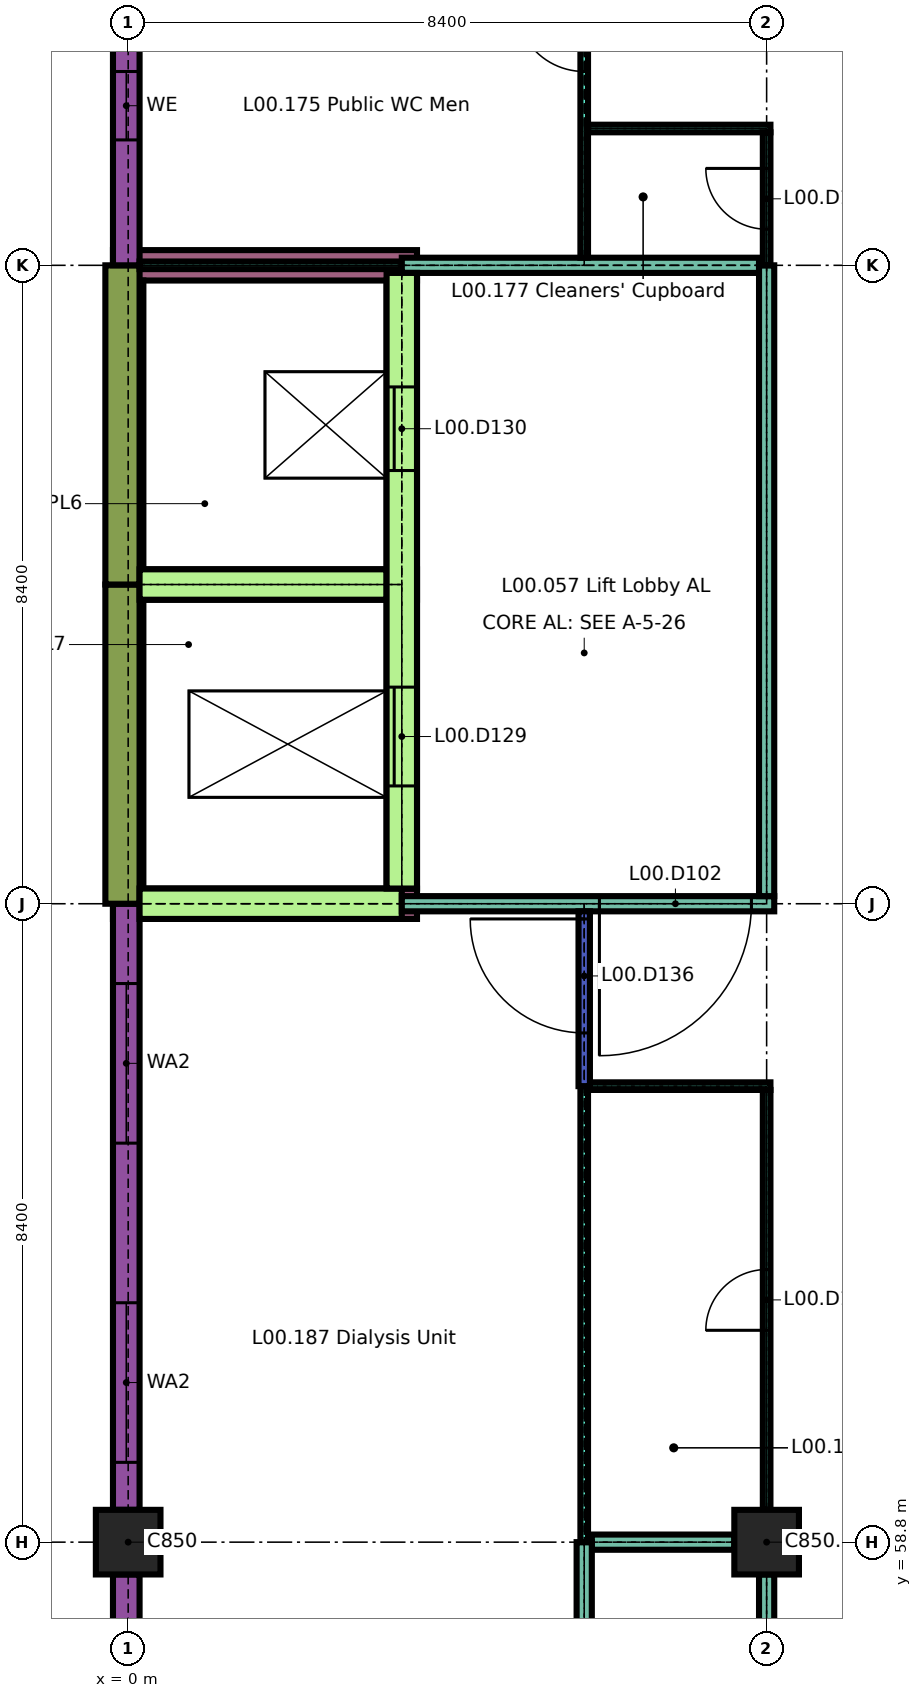
"""IFC4 building model, lengths in metres.
Left out: names, types, materials, properties, quantities, classifications, styles, units other than length and angle.
Written with IfcOpenShell. Run it as: python <this file> out.ifc"""

import sys

from ifc_helpers import new_model, si_unit, direction, frame, frame_2d, origin, origin_2d, place, context, subcontext, project, spatial, rectangle, extrude, element, fill, save


model = new_model("IFC4")
c1 = context("Model", 3, precision=1e-05, world=origin(), true_north=direction((0.0, 1.0)))
c2 = subcontext(c1, "Body", "Model", "MODEL_VIEW")
j1 = project(units=[si_unit("LENGTHUNIT", "METRE"), si_unit("PLANEANGLEUNIT", "RADIAN")], contexts=[c1])
p1 = place(None, origin())
s1 = spatial("IfcSite", under=j1, at=p1, CompositionType="ELEMENT")
p2 = place(p1, origin())
s2 = spatial("IfcBuilding", under=s1, at=p2, CompositionType="ELEMENT")
p3 = place(p2, origin())
s3 = spatial("IfcBuildingStorey", under=s2, at=p3, CompositionType="ELEMENT", Elevation=0.0)
for number, where, z_axis, x_axis in (
    (1, (-0.2, 67.2, -1.4), (0.0, 0.0, 1.0), (1.0, 0.0, 0.0)),
    (2, (-0.2, 71.4, -1.4), (0.0, 0.0, 1.0), (1.0, 0.0, 0.0)),
    (3, (-0.2, 75.6, -1.4), (0.0, 0.0, 1.0), (1.0, 0.0, 0.0)),
):
    element("IfcWall", number, at=place(p3, frame(where, z_axis=z_axis, x_axis=x_axis)), inside=s3, PredefinedType="SOLIDWALL", context=c2, shape_type="SweptSolid", body=[
        extrude(rectangle(XDim=4.0, YDim=0.4, at=frame_2d((2.0, 0.0))), origin(), (0.0, 0.0, 1.0), 0.95),
    ])
for number, where, z_axis, x_axis in (
    (4, (0.0, 67.4, -1.4), (0.0, 0.0, 1.0), (0.0, 1.0, 0.0)),
    (5, (3.6, 67.4, -1.4), (0.0, 0.0, 1.0), (0.0, 1.0, 0.0)),
):
    element("IfcWall", number, at=place(p3, frame(where, z_axis=z_axis, x_axis=x_axis)), inside=s3, PredefinedType="SOLIDWALL", context=c2, shape_type="SweptSolid", body=[
        extrude(rectangle(XDim=8.0, YDim=0.4, at=frame_2d((4.0, 0.0))), origin(), (0.0, 0.0, 1.0), 0.95),
    ])
for number, where, z_axis, x_axis in (
    (6, (0.0, 58.8, 0.0), (0.0, 0.0, 1.0), (1.0, 0.0, 0.0)),
    (7, (8.4, 58.8, 0.0), (0.0, 0.0, 1.0), (1.0, 0.0, 0.0)),
):
    element("IfcColumn", number, at=place(p3, frame(where, z_axis=z_axis, x_axis=x_axis)), inside=s3, PredefinedType="COLUMN", context=c2, shape_type="SweptSolid", body=[
        extrude(rectangle(XDim=0.85, YDim=0.85, at=origin_2d()), origin(), (0.0, 0.0, 1.0), 4.14),
    ])
p4 = place(p3, frame((-0.025, 50.825, 0.0), z_axis=(0.0, 0.0, 1.0), x_axis=(0.0, 1.0, 0.0)))
e8 = element("IfcWall", 8, at=p4, inside=s3, PredefinedType="SOLIDWALL", context=c2, shape_type="SweptSolid", body=[
    extrude(rectangle(XDim=7.55, YDim=0.35, at=frame_2d((3.775, 0.0))), origin(), (0.0, 0.0, 1.0), 3.84),
])
p5 = place(p4, frame((0.625, 0.0, 0.9)))
e9 = element("IfcOpeningElement", 9, at=p5, cuts=e8, PredefinedType="OPENING", context=c2, shape_type="SweptSolid", body=[
    extrude(rectangle(XDim=2.1, YDim=2.1, at=frame_2d((1.05, 1.05))), frame((0.0, 0.185, 0.0), z_axis=(0.0, -1.0, 0.0), x_axis=(1.0, 0.0, 0.0)), (0.0, 0.0, 1.0), 0.37),
])
p6 = place(p4, frame((4.825, 0.0, 0.9)))
e10 = element("IfcOpeningElement", 10, at=p6, cuts=e8, PredefinedType="OPENING", context=c2, shape_type="SweptSolid", body=[
    extrude(rectangle(XDim=2.1, YDim=2.1, at=frame_2d((1.05, 1.05))), frame((0.0, 0.185, 0.0), z_axis=(0.0, -1.0, 0.0), x_axis=(1.0, 0.0, 0.0)), (0.0, 0.0, 1.0), 0.37),
])
p7 = place(p3, frame((-0.025, 59.225, 0.0), z_axis=(0.0, 0.0, 1.0), x_axis=(0.0, 1.0, 0.0)))
e11 = element("IfcWall", 11, at=p7, inside=s3, PredefinedType="SOLIDWALL", context=c2, shape_type="SweptSolid", body=[
    extrude(rectangle(XDim=7.975, YDim=0.35, at=frame_2d((3.987, 0.0))), origin(), (0.0, 0.0, 1.0), 3.84),
])
p8 = place(p7, frame((0.625, 0.0, 0.9)))
e12 = element("IfcOpeningElement", 12, at=p8, cuts=e11, PredefinedType="OPENING", context=c2, shape_type="SweptSolid", body=[
    extrude(rectangle(XDim=2.1, YDim=2.1, at=frame_2d((1.05, 1.05))), frame((0.0, 0.185, 0.0), z_axis=(0.0, -1.0, 0.0), x_axis=(1.0, 0.0, 0.0)), (0.0, 0.0, 1.0), 0.37),
])
p9 = place(p7, frame((4.825, 0.0, 0.9)))
e13 = element("IfcOpeningElement", 13, at=p9, cuts=e11, PredefinedType="OPENING", context=c2, shape_type="SweptSolid", body=[
    extrude(rectangle(XDim=2.1, YDim=2.1, at=frame_2d((1.05, 1.05))), frame((0.0, 0.185, 0.0), z_axis=(0.0, -1.0, 0.0), x_axis=(1.0, 0.0, 0.0)), (0.0, 0.0, 1.0), 0.37),
])
p10 = place(p3, frame((-0.075, 67.2, 0.0), z_axis=(0.0, 0.0, 1.0), x_axis=(0.0, 1.0, 0.0)))
e14 = element("IfcWall", 14, at=p10, inside=s3, PredefinedType="SOLIDWALL", context=c2, shape_type="SweptSolid", body=[
    extrude(rectangle(XDim=4.2, YDim=0.45, at=frame_2d((2.1, 0.0))), origin(), (0.0, 0.0, 1.0), 4.14),
])
p11 = place(p3, frame((-0.075, 71.4, 0.0), z_axis=(0.0, 0.0, 1.0), x_axis=(0.0, 1.0, 0.0)))
e15 = element("IfcWall", 15, at=p11, inside=s3, PredefinedType="SOLIDWALL", context=c2, shape_type="SweptSolid", body=[
    extrude(rectangle(XDim=4.2, YDim=0.45, at=frame_2d((2.1, 0.0))), origin(), (0.0, 0.0, 1.0), 4.14),
])
p12 = place(p3, frame((-0.025, 75.6, 0.0), z_axis=(0.0, 0.0, 1.0), x_axis=(0.0, 1.0, 0.0)))
e16 = element("IfcWall", 16, at=p12, inside=s3, PredefinedType="SOLIDWALL", context=c2, shape_type="SweptSolid", body=[
    extrude(rectangle(XDim=4.2, YDim=0.35, at=frame_2d((2.1, 0.0))), origin(), (0.0, 0.0, 1.0), 3.84),
])
p13 = place(p12, frame((1.65, 0.0, 1.5)))
e17 = element("IfcOpeningElement", 17, at=p13, cuts=e16, PredefinedType="OPENING", context=c2, shape_type="SweptSolid", body=[
    extrude(rectangle(XDim=0.9, YDim=0.6, at=frame_2d((0.45, 0.3))), frame((0.0, 0.185, 0.0), z_axis=(0.0, -1.0, 0.0), x_axis=(1.0, 0.0, 0.0)), (0.0, 0.0, 1.0), 0.37),
])
p14 = place(p3, frame((6.1, 58.8, 0.0), z_axis=(0.0, 0.0, 1.0), x_axis=(1.0, 0.0, 0.0)))
e18 = element("IfcWall", 18, at=p14, inside=s3, PredefinedType="PARTITIONING", context=c2, shape_type="SweptSolid", body=[
    extrude(rectangle(XDim=1.875, YDim=0.2, at=frame_2d((0.938, 0.0))), origin(), (0.0, 0.0, 1.0), 4.14),
])
p15 = place(p3, frame((6.075, 64.8, 0.0), z_axis=(0.0, 0.0, 1.0), x_axis=(1.0, 0.0, 0.0)))
e19 = element("IfcWall", 19, at=p15, inside=s3, PredefinedType="PARTITIONING", context=c2, shape_type="SweptSolid", body=[
    extrude(rectangle(XDim=2.375, YDim=0.1, at=frame_2d((1.188, 0.0))), origin(), (0.0, 0.0, 1.0), 4.14),
])
p16 = place(p3, frame((0.15, 67.2, 0.0), z_axis=(0.0, 0.0, 1.0), x_axis=(1.0, 0.0, 0.0)))
e20 = element("IfcWall", 20, at=p16, inside=s3, PredefinedType="SHEAR", context=c2, shape_type="SweptSolid", body=[
    extrude(rectangle(XDim=3.45, YDim=0.4, at=frame_2d((1.725, 0.0))), origin(), (0.0, 0.0, 1.0), 4.14),
])
p17 = place(p3, frame((3.6, 67.2, 0.0), z_axis=(0.0, 0.0, 1.0), x_axis=(1.0, 0.0, 0.0)))
e21 = element("IfcWall", 21, at=p17, inside=s3, PredefinedType="PARTITIONING", context=c2, shape_type="SweptSolid", body=[
    extrude(rectangle(XDim=4.9, YDim=0.2, at=frame_2d((2.45, 0.0))), origin(), (0.0, 0.0, 1.0), 4.14),
])
p18 = place(p17, frame((2.6, 0.0, 0.0)))
e22 = element("IfcOpeningElement", 22, at=p18, cuts=e21, PredefinedType="OPENING", context=c2, shape_type="SweptSolid", body=[
    extrude(rectangle(XDim=2.0, YDim=2.4, at=frame_2d((1.0, 1.2))), frame((0.0, 0.11, 0.0), z_axis=(0.0, -1.0, 0.0), x_axis=(1.0, 0.0, 0.0)), (0.0, 0.0, 1.0), 0.22),
])
p19 = place(p3, frame((0.15, 71.4, 0.0), z_axis=(0.0, 0.0, 1.0), x_axis=(1.0, 0.0, 0.0)))
e23 = element("IfcWall", 23, at=p19, inside=s3, PredefinedType="SHEAR", context=c2, shape_type="SweptSolid", body=[
    extrude(rectangle(XDim=3.25, YDim=0.4, at=frame_2d((1.625, 0.0))), origin(), (0.0, 0.0, 1.0), 4.14),
])
p20 = place(p3, frame((0.15, 75.6, 0.0), z_axis=(0.0, 0.0, 1.0), x_axis=(1.0, 0.0, 0.0)))
e24 = element("IfcWall", 24, at=p20, inside=s3, PredefinedType="PARTITIONING", context=c2, shape_type="SweptSolid", body=[
    extrude(rectangle(XDim=3.45, YDim=0.1, at=frame_2d((1.725, 0.0))), origin(), (0.0, 0.0, 1.0), 4.14),
])
p21 = place(p3, frame((3.6, 75.6, 0.0), z_axis=(0.0, 0.0, 1.0), x_axis=(1.0, 0.0, 0.0)))
e25 = element("IfcWall", 25, at=p21, inside=s3, PredefinedType="PARTITIONING", context=c2, shape_type="SweptSolid", body=[
    extrude(rectangle(XDim=4.7, YDim=0.2, at=frame_2d((2.35, 0.0))), origin(), (0.0, 0.0, 1.0), 4.14),
])
p22 = place(p3, frame((6.05, 77.4, 0.0), z_axis=(0.0, 0.0, 1.0), x_axis=(1.0, 0.0, 0.0)))
e26 = element("IfcWall", 26, at=p22, inside=s3, PredefinedType="PARTITIONING", context=c2, shape_type="SweptSolid", body=[
    extrude(rectangle(XDim=2.4, YDim=0.1, at=frame_2d((1.2, 0.0))), origin(), (0.0, 0.0, 1.0), 4.14),
])
p23 = place(p3, frame((3.6, 67.4, 0.0), z_axis=(0.0, 0.0, 1.0), x_axis=(0.0, 1.0, 0.0)))
e27 = element("IfcWall", 27, at=p23, inside=s3, PredefinedType="SHEAR", context=c2, shape_type="SweptSolid", body=[
    extrude(rectangle(XDim=8.1, YDim=0.4, at=frame_2d((4.05, 0.0))), origin(), (0.0, 0.0, 1.0), 4.14),
])
p24 = place(p23, frame((1.35, 0.0, 0.0)))
e28 = element("IfcOpeningElement", 28, at=p24, cuts=e27, PredefinedType="OPENING", context=c2, shape_type="SweptSolid", body=[
    extrude(rectangle(XDim=1.3, YDim=2.1, at=frame_2d((0.65, 1.05))), frame((0.0, 0.21, 0.0), z_axis=(0.0, -1.0, 0.0), x_axis=(1.0, 0.0, 0.0)), (0.0, 0.0, 1.0), 0.42),
])
p25 = place(p23, frame((5.5, 0.0, 0.0)))
e29 = element("IfcOpeningElement", 29, at=p25, cuts=e27, PredefinedType="OPENING", context=c2, shape_type="SweptSolid", body=[
    extrude(rectangle(XDim=1.1, YDim=2.1, at=frame_2d((0.55, 1.05))), frame((0.0, 0.21, 0.0), z_axis=(0.0, -1.0, 0.0), x_axis=(1.0, 0.0, 0.0)), (0.0, 0.0, 1.0), 0.42),
])
p26 = place(p3, frame((6.0, 52.8, 0.0), z_axis=(0.0, 0.0, 1.0), x_axis=(0.0, 1.0, 0.0)))
e30 = element("IfcWall", 30, at=p26, inside=s3, PredefinedType="PARTITIONING", context=c2, shape_type="SweptSolid", body=[
    extrude(rectangle(XDim=6.0, YDim=0.2, at=frame_2d((3.0, 0.0))), origin(), (0.0, 0.0, 1.0), 4.14),
])
p27 = place(p3, frame((6.0, 58.8, 0.0), z_axis=(0.0, 0.0, 1.0), x_axis=(0.0, 1.0, 0.0)))
e31 = element("IfcWall", 31, at=p27, inside=s3, PredefinedType="PARTITIONING", context=c2, shape_type="SweptSolid", body=[
    extrude(rectangle(XDim=6.0, YDim=0.1, at=frame_2d((3.0, 0.0))), origin(), (0.0, 0.0, 1.0), 4.14),
])
p28 = place(p3, frame((6.0, 64.8, 0.0), z_axis=(0.0, 0.0, 1.0), x_axis=(0.0, 1.0, 0.0)))
e32 = element("IfcWall", 32, at=p28, inside=s3, PredefinedType="PARTITIONING", context=c2, shape_type="SweptSolid", body=[
    extrude(rectangle(XDim=2.3, YDim=0.15, at=frame_2d((1.15, 0.0))), origin(), (0.0, 0.0, 1.0), 4.14),
])
p29 = place(p28, frame((0.7, 0.0, 0.0)))
e33 = element("IfcOpeningElement", 33, at=p29, cuts=e32, PredefinedType="OPENING", context=c2, shape_type="SweptSolid", body=[
    extrude(rectangle(XDim=1.5, YDim=2.4, at=frame_2d((0.75, 1.2))), frame((0.0, 0.085, 0.0), z_axis=(0.0, -1.0, 0.0), x_axis=(1.0, 0.0, 0.0)), (0.0, 0.0, 1.0), 0.17),
])
p30 = place(p3, frame((6.0, 75.7, 0.0), z_axis=(0.0, 0.0, 1.0), x_axis=(0.0, 1.0, 0.0)))
e34 = element("IfcWall", 34, at=p30, inside=s3, PredefinedType="PARTITIONING", context=c2, shape_type="SweptSolid", body=[
    extrude(rectangle(XDim=8.25, YDim=0.1, at=frame_2d((4.125, 0.0))), origin(), (0.0, 0.0, 1.0), 4.14),
])
p31 = place(p30, frame((2.45, 0.0, 0.0)))
e35 = element("IfcOpeningElement", 35, at=p31, cuts=e34, PredefinedType="OPENING", context=c2, shape_type="SweptSolid", body=[
    extrude(rectangle(XDim=0.9, YDim=2.1, at=frame_2d((0.45, 1.05))), frame((0.0, 0.06, 0.0), z_axis=(0.0, -1.0, 0.0), x_axis=(1.0, 0.0, 0.0)), (0.0, 0.0, 1.0), 0.12),
])
p32 = place(p30, frame((4.85, 0.0, 0.0)))
e36 = element("IfcOpeningElement", 36, at=p32, cuts=e34, PredefinedType="OPENING", context=c2, shape_type="SweptSolid", body=[
    extrude(rectangle(XDim=0.9, YDim=2.1, at=frame_2d((0.45, 1.05))), frame((0.0, 0.06, 0.0), z_axis=(0.0, -1.0, 0.0), x_axis=(1.0, 0.0, 0.0)), (0.0, 0.0, 1.0), 0.12),
])
p33 = place(p3, frame((8.4, 52.9, 0.0), z_axis=(0.0, 0.0, 1.0), x_axis=(0.0, 1.0, 0.0)))
e37 = element("IfcWall", 37, at=p33, inside=s3, PredefinedType="PARTITIONING", context=c2, shape_type="SweptSolid", body=[
    extrude(rectangle(XDim=5.475, YDim=0.2, at=frame_2d((2.738, 0.0))), origin(), (0.0, 0.0, 1.0), 4.14),
])
p34 = place(p33, frame((2.288, 0.0, 0.0)))
e38 = element("IfcOpeningElement", 38, at=p34, cuts=e37, PredefinedType="OPENING", context=c2, shape_type="SweptSolid", body=[
    extrude(rectangle(XDim=0.9, YDim=2.1, at=frame_2d((0.45, 1.05))), frame((0.0, 0.11, 0.0), z_axis=(0.0, -1.0, 0.0), x_axis=(1.0, 0.0, 0.0)), (0.0, 0.0, 1.0), 0.22),
])
p35 = place(p3, frame((8.4, 59.225, 0.0), z_axis=(0.0, 0.0, 1.0), x_axis=(0.0, 1.0, 0.0)))
e39 = element("IfcWall", 39, at=p35, inside=s3, PredefinedType="PARTITIONING", context=c2, shape_type="SweptSolid", body=[
    extrude(rectangle(XDim=5.525, YDim=0.1, at=frame_2d((2.762, 0.0))), origin(), (0.0, 0.0, 1.0), 4.14),
])
p36 = place(p35, frame((2.363, 0.0, 0.0)))
e40 = element("IfcOpeningElement", 40, at=p36, cuts=e39, PredefinedType="OPENING", context=c2, shape_type="SweptSolid", body=[
    extrude(rectangle(XDim=0.8, YDim=2.1, at=frame_2d((0.4, 1.05))), frame((0.0, 0.06, 0.0), z_axis=(0.0, -1.0, 0.0), x_axis=(1.0, 0.0, 0.0)), (0.0, 0.0, 1.0), 0.12),
])
p37 = place(p3, frame((8.4, 67.3, 0.0), z_axis=(0.0, 0.0, 1.0), x_axis=(0.0, 1.0, 0.0)))
e41 = element("IfcWall", 41, at=p37, inside=s3, PredefinedType="PARTITIONING", context=c2, shape_type="SweptSolid", body=[
    extrude(rectangle(XDim=8.3, YDim=0.2, at=frame_2d((4.15, 0.0))), origin(), (0.0, 0.0, 1.0), 4.14),
])
p38 = place(p3, frame((8.4, 75.6, 0.0), z_axis=(0.0, 0.0, 1.0), x_axis=(0.0, 1.0, 0.0)))
e42 = element("IfcWall", 42, at=p38, inside=s3, PredefinedType="PARTITIONING", context=c2, shape_type="SweptSolid", body=[
    extrude(rectangle(XDim=1.75, YDim=0.1, at=frame_2d((0.875, 0.0))), origin(), (0.0, 0.0, 1.0), 4.14),
])
p39 = place(p38, frame((0.475, 0.0, 0.0)))
e43 = element("IfcOpeningElement", 43, at=p39, cuts=e42, PredefinedType="OPENING", context=c2, shape_type="SweptSolid", body=[
    extrude(rectangle(XDim=0.8, YDim=2.1, at=frame_2d((0.4, 1.05))), frame((0.0, 0.06, 0.0), z_axis=(0.0, -1.0, 0.0), x_axis=(1.0, 0.0, 0.0)), (0.0, 0.0, 1.0), 0.12),
])
p40 = place(p8, origin())
e44 = element("IfcWindow", 44, at=p40, inside=s3, PartitioningType="DOUBLE_PANEL_VERTICAL", PredefinedType="WINDOW", context=c2, shape_type="SweptSolid", body=[
    extrude(rectangle(XDim=2.1, YDim=2.1, at=frame_2d((1.05, 1.05))), frame((0.0, 0.03, 0.0), z_axis=(0.0, -1.0, 0.0), x_axis=(1.0, 0.0, 0.0)), (0.0, 0.0, 1.0), 0.06),
])
fill(e12, e44)
p41 = place(p9, origin())
e45 = element("IfcWindow", 45, at=p41, inside=s3, PartitioningType="DOUBLE_PANEL_VERTICAL", PredefinedType="WINDOW", context=c2, shape_type="SweptSolid", body=[
    extrude(rectangle(XDim=2.1, YDim=2.1, at=frame_2d((1.05, 1.05))), frame((0.0, 0.03, 0.0), z_axis=(0.0, -1.0, 0.0), x_axis=(1.0, 0.0, 0.0)), (0.0, 0.0, 1.0), 0.06),
])
fill(e13, e45)
p42 = place(p13, origin())
e46 = element("IfcWindow", 46, at=p42, inside=s3, PartitioningType="SINGLE_PANEL", PredefinedType="WINDOW", context=c2, shape_type="SweptSolid", body=[
    extrude(rectangle(XDim=0.9, YDim=0.6, at=frame_2d((0.45, 0.3))), frame((0.0, 0.03, 0.0), z_axis=(0.0, -1.0, 0.0), x_axis=(1.0, 0.0, 0.0)), (0.0, 0.0, 1.0), 0.06),
])
fill(e17, e46)
p43 = place(p18, origin())
e47 = element("IfcDoor", 47, at=p43, inside=s3, OperationType="SINGLE_SWING_LEFT", PredefinedType="DOOR", context=c2, shape_type="SweptSolid", body=[
    extrude(rectangle(XDim=2.0, YDim=2.4, at=frame_2d((1.0, 1.2))), frame((0.0, 0.03, 0.0), z_axis=(0.0, -1.0, 0.0), x_axis=(1.0, 0.0, 0.0)), (0.0, 0.0, 1.0), 0.06),
])
fill(e22, e47)
p44 = place(p24, origin())
e48 = element("IfcDoor", 48, at=p44, inside=s3, OperationType="SLIDING_TO_LEFT", PredefinedType="DOOR", context=c2, shape_type="SweptSolid", body=[
    extrude(rectangle(XDim=1.3, YDim=2.1, at=frame_2d((0.65, 1.05))), frame((0.0, 0.025, 0.0), z_axis=(0.0, -1.0, 0.0), x_axis=(1.0, 0.0, 0.0)), (0.0, 0.0, 1.0), 0.05),
])
fill(e28, e48)
p45 = place(p25, origin())
e49 = element("IfcDoor", 49, at=p45, inside=s3, OperationType="SLIDING_TO_LEFT", PredefinedType="DOOR", context=c2, shape_type="SweptSolid", body=[
    extrude(rectangle(XDim=1.1, YDim=2.1, at=frame_2d((0.55, 1.05))), frame((0.0, 0.025, 0.0), z_axis=(0.0, -1.0, 0.0), x_axis=(1.0, 0.0, 0.0)), (0.0, 0.0, 1.0), 0.05),
])
fill(e29, e49)
p46 = place(p29, origin())
e50 = element("IfcDoor", 50, at=p46, inside=s3, OperationType="SINGLE_SWING_LEFT", PredefinedType="DOOR", context=c2, shape_type="SweptSolid", body=[
    extrude(rectangle(XDim=1.5, YDim=2.4, at=frame_2d((0.75, 1.2))), frame((0.0, 0.03, 0.0), z_axis=(0.0, -1.0, 0.0), x_axis=(1.0, 0.0, 0.0)), (0.0, 0.0, 1.0), 0.06),
])
fill(e33, e50)
p47 = place(p31, origin())
e51 = element("IfcDoor", 51, at=p47, inside=s3, OperationType="SINGLE_SWING_LEFT", PredefinedType="DOOR", context=c2, shape_type="SweptSolid", body=[
    extrude(rectangle(XDim=0.9, YDim=2.1, at=frame_2d((0.45, 1.05))), frame((0.0, 0.02, 0.0), z_axis=(0.0, -1.0, 0.0), x_axis=(1.0, 0.0, 0.0)), (0.0, 0.0, 1.0), 0.04),
])
fill(e35, e51)
p48 = place(p36, origin())
e52 = element("IfcDoor", 52, at=p48, inside=s3, OperationType="SINGLE_SWING_RIGHT", PredefinedType="DOOR", context=c2, shape_type="SweptSolid", body=[
    extrude(rectangle(XDim=0.8, YDim=2.1, at=frame_2d((0.4, 1.05))), frame((0.0, 0.02, 0.0), z_axis=(0.0, -1.0, 0.0), x_axis=(1.0, 0.0, 0.0)), (0.0, 0.0, 1.0), 0.04),
])
fill(e40, e52)
p49 = place(p39, origin())
e53 = element("IfcDoor", 53, at=p49, inside=s3, OperationType="SINGLE_SWING_LEFT", PredefinedType="DOOR", context=c2, shape_type="SweptSolid", body=[
    extrude(rectangle(XDim=0.8, YDim=2.1, at=frame_2d((0.4, 1.05))), frame((0.0, 0.02, 0.0), z_axis=(0.0, -1.0, 0.0), x_axis=(1.0, 0.0, 0.0)), (0.0, 0.0, 1.0), 0.04),
])
fill(e43, e53)
save(model, sys.argv[1])
